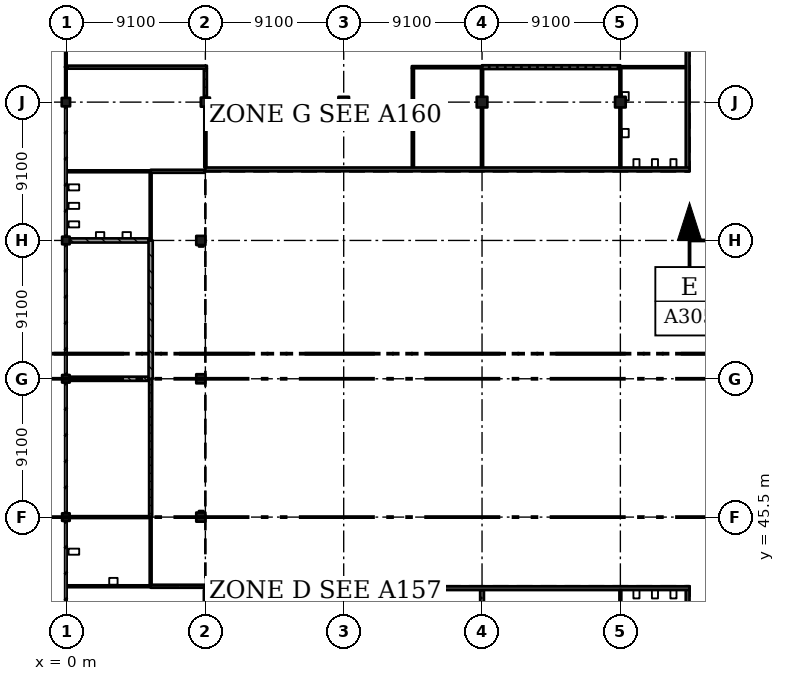
"""IFC4 building model, lengths in metres.
Left out: names, types, materials, properties, quantities, classifications, styles, units other than length and angle.
Written with IfcOpenShell. Run it as: python <this file> out.ifc"""

import sys

from ifc_helpers import new_model, si_unit, direction, frame, frame_2d, origin, origin_2d, place, context, subcontext, project, spatial, rectangle, extrude, element, fill, save


model = new_model("IFC4")
c1 = context("Model", 3, precision=1e-05, world=origin(), true_north=direction((0.0, 1.0)))
c2 = subcontext(c1, "Body", "Model", "MODEL_VIEW")
j1 = project(units=[si_unit("LENGTHUNIT", "METRE"), si_unit("PLANEANGLEUNIT", "RADIAN")], contexts=[c1])
p1 = place(None, origin())
s1 = spatial("IfcSite", under=j1, at=p1, CompositionType="ELEMENT")
p2 = place(p1, origin())
s2 = spatial("IfcBuilding", under=s1, at=p2, CompositionType="ELEMENT")
p3 = place(p2, frame((0.0, 0.0, 20.02)))
s3 = spatial("IfcBuildingStorey", under=s2, at=p3, CompositionType="ELEMENT", Elevation=20.02)
for number, where, z_axis, x_axis in (
    (1, (-0.075, 45.5, 0.0), (0.0, 0.0, 1.0), (1.0, 0.0, 0.0)),
    (2, (-0.075, 54.6, 0.0), (0.0, 0.0, 1.0), (1.0, 0.0, 0.0)),
    (3, (-0.075, 63.7, 0.0), (0.0, 0.0, 1.0), (1.0, 0.0, 0.0)),
):
    element("IfcColumn", number, at=place(p3, frame(where, z_axis=z_axis, x_axis=x_axis)), inside=s3, PredefinedType="COLUMN", context=c2, shape_type="SweptSolid", body=[
        extrude(rectangle(XDim=0.5, YDim=0.5, at=origin_2d()), origin(), (0.0, 0.0, 1.0), 4.55),
    ])
p4 = place(p3, frame((-0.075, 72.8, 0.0), z_axis=(0.0, 0.0, 1.0), x_axis=(1.0, 0.0, 0.0)))
e4 = element("IfcColumn", 4, at=p4, inside=s3, PredefinedType="COLUMN", context=c2, shape_type="SweptSolid", body=[
    extrude(rectangle(XDim=0.55, YDim=0.55, at=origin_2d()), origin(), (0.0, 0.0, 1.0), 4.55),
])
for number, where, z_axis, x_axis in (
    (5, (8.8, 45.5, 0.0), (0.0, 0.0, 1.0), (1.0, 0.0, 0.0)),
    (6, (8.8, 54.6, 0.0), (0.0, 0.0, 1.0), (1.0, 0.0, 0.0)),
    (7, (8.8, 63.7, 0.0), (0.0, 0.0, 1.0), (1.0, 0.0, 0.0)),
    (8, (9.1, 72.8, 0.0), (0.0, 0.0, 1.0), (1.0, 0.0, 0.0)),
):
    element("IfcColumn", number, at=place(p3, frame(where, z_axis=z_axis, x_axis=x_axis)), inside=s3, PredefinedType="COLUMN", context=c2, shape_type="SweptSolid", body=[
        extrude(rectangle(XDim=0.6, YDim=0.6, at=origin_2d()), origin(), (0.0, 0.0, 1.0), 4.55),
    ])
for number, where, z_axis, x_axis in (
    (9, (18.2, 72.8, 0.0), (0.0, 0.0, 1.0), (1.0, 0.0, 0.0)),
    (10, (27.3, 72.8, 0.0), (0.0, 0.0, 1.0), (1.0, 0.0, 0.0)),
    (11, (36.4, 72.8, 0.0), (0.0, 0.0, 1.0), (1.0, 0.0, 0.0)),
):
    element("IfcColumn", number, at=place(p3, frame(where, z_axis=z_axis, x_axis=x_axis)), inside=s3, PredefinedType="COLUMN", context=c2, shape_type="SweptSolid", body=[
        extrude(rectangle(XDim=0.7, YDim=0.7, at=origin_2d()), origin(), (0.0, 0.0, 1.0), 4.55),
    ])
p5 = place(p3, frame((40.825, 68.25, 0.0), z_axis=(0.0, 0.0, 1.0), x_axis=(0.0, 1.0, 0.0)))
e12 = element("IfcWall", 12, at=p5, inside=s3, PredefinedType="SHEAR", context=c2, shape_type="SweptSolid", body=[
    extrude(rectangle(XDim=31.85, YDim=0.25, at=frame_2d((15.925, 0.0))), origin(), (0.0, 0.0, 1.0), 4.55),
])
for number, where, z_axis, x_axis in (
    (13, (40.825, 40.95, 0.0), (0.0, 0.0, 1.0), (0.0, -1.0, 0.0)),
    (14, (40.95, 40.825, 0.0), (0.0, 0.0, 1.0), (-1.0, 0.0, 0.0)),
    (15, (40.95, 68.375, 0.0), (0.0, 0.0, 1.0), (-1.0, 0.0, 0.0)),
):
    element("IfcWall", number, at=place(p3, frame(where, z_axis=z_axis, x_axis=x_axis)), inside=s3, PredefinedType="SHEAR", context=c2, shape_type="SweptSolid", body=[
        extrude(rectangle(XDim=31.85, YDim=0.25, at=frame_2d((15.925, 0.0))), origin(), (0.0, 0.0, 1.0), 4.55),
    ])
p6 = place(p3, frame((0.03, 40.95, 0.0), z_axis=(0.0, 0.0, 1.0), x_axis=(1.0, 0.0, 0.0)))
e16 = element("IfcWall", 16, at=p6, inside=s3, PredefinedType="PARTITIONING", context=c2, shape_type="SweptSolid", body=[
    extrude(rectangle(XDim=5.47, YDim=0.125, at=frame_2d((2.735, 0.0))), origin(), (0.0, 0.0, 1.0), 4.25),
])
p7 = place(p3, frame((0.175, 45.5, 0.0), z_axis=(0.0, 0.0, 1.0), x_axis=(1.0, 0.0, 0.0)))
e17 = element("IfcWall", 17, at=p7, inside=s3, PredefinedType="PARTITIONING", context=c2, shape_type="SweptSolid", body=[
    extrude(rectangle(XDim=5.225, YDim=0.125, at=frame_2d((2.612, 0.0))), origin(), (0.0, 0.0, 1.0), 3.55),
])
for number, where, z_axis, x_axis in (
    (18, (0.175, 54.6, 0.0), (0.0, 0.0, 1.0), (1.0, 0.0, 0.0)),
    (19, (0.175, 63.7, 0.0), (0.0, 0.0, 1.0), (1.0, 0.0, 0.0)),
):
    element("IfcWall", number, at=place(p3, frame(where, z_axis=z_axis, x_axis=x_axis)), inside=s3, PredefinedType="SOLIDWALL", context=c2, shape_type="SweptSolid", body=[
        extrude(rectangle(XDim=5.188, YDim=0.275, at=frame_2d((2.594, 0.0))), origin(), (0.0, 0.0, 1.0), 3.55),
    ])
p8 = place(p3, frame((5.5, 40.95, 0.0), z_axis=(0.0, 0.0, 1.0), x_axis=(1.0, 0.0, 0.0)))
e20 = element("IfcWall", 20, at=p8, inside=s3, PredefinedType="PARTITIONING", context=c2, shape_type="SweptSolid", body=[
    extrude(rectangle(XDim=3.57, YDim=0.2, at=frame_2d((1.785, 0.0))), origin(), (0.0, 0.0, 1.0), 4.25),
])
p9 = place(p8, frame((0.55, 0.0, 0.0)))
e21 = element("IfcOpeningElement", 21, at=p9, cuts=e20, PredefinedType="OPENING", context=c2, shape_type="SweptSolid", body=[
    extrude(rectangle(XDim=2.4, YDim=2.4, at=frame_2d((1.2, 1.2))), frame((0.0, 0.11, 0.0), z_axis=(0.0, -1.0, 0.0), x_axis=(1.0, 0.0, 0.0)), (0.0, 0.0, 1.0), 0.22),
])
p10 = place(p3, frame((5.5, 41.05, 0.0), z_axis=(0.0, 0.0, 1.0), x_axis=(0.0, 1.0, 0.0)))
e22 = element("IfcWall", 22, at=p10, inside=s3, PredefinedType="PARTITIONING", context=c2, shape_type="SweptSolid", body=[
    extrude(rectangle(XDim=4.45, YDim=0.125, at=frame_2d((2.225, 0.0))), origin(), (0.0, 0.0, 1.0), 4.25),
])
p11 = place(p10, frame((1.75, 0.0, 0.0)))
e23 = element("IfcOpeningElement", 23, at=p11, cuts=e22, PredefinedType="OPENING", context=c2, shape_type="SweptSolid", body=[
    extrude(rectangle(XDim=1.0, YDim=2.1, at=frame_2d((0.5, 1.05))), frame((0.0, 0.073, 0.0), z_axis=(0.0, -1.0, 0.0), x_axis=(1.0, 0.0, 0.0)), (0.0, 0.0, 1.0), 0.145),
])
p12 = place(p3, frame((5.5, 45.5, 0.0), z_axis=(0.0, 0.0, 1.0), x_axis=(0.0, 1.0, 0.0)))
e24 = element("IfcWall", 24, at=p12, inside=s3, PredefinedType="PARTITIONING", context=c2, shape_type="SweptSolid", body=[
    extrude(rectangle(XDim=9.1, YDim=0.2, at=frame_2d((4.55, 0.0))), origin(), (0.0, 0.0, 1.0), 4.25),
])
p13 = place(p12, frame((4.05, 0.0, 0.0)))
e25 = element("IfcOpeningElement", 25, at=p13, cuts=e24, PredefinedType="OPENING", context=c2, shape_type="SweptSolid", body=[
    extrude(rectangle(XDim=1.0, YDim=2.1, at=frame_2d((0.5, 1.05))), frame((0.0, 0.11, 0.0), z_axis=(0.0, -1.0, 0.0), x_axis=(1.0, 0.0, 0.0)), (0.0, 0.0, 1.0), 0.22),
])
p14 = place(p3, frame((5.5, 54.6, 0.0), z_axis=(0.0, 0.0, 1.0), x_axis=(0.0, 1.0, 0.0)))
e26 = element("IfcWall", 26, at=p14, inside=s3, PredefinedType="SOLIDWALL", context=c2, shape_type="SweptSolid", body=[
    extrude(rectangle(XDim=9.1, YDim=0.275, at=frame_2d((4.55, 0.0))), origin(), (0.0, 0.0, 1.0), 4.25),
])
p15 = place(p14, frame((3.95, 0.0, 0.0)))
e27 = element("IfcOpeningElement", 27, at=p15, cuts=e26, PredefinedType="OPENING", context=c2, shape_type="SweptSolid", body=[
    extrude(rectangle(XDim=1.2, YDim=2.4, at=frame_2d((0.6, 1.2))), frame((0.0, 0.147, 0.0), z_axis=(0.0, -1.0, 0.0), x_axis=(1.0, 0.0, 0.0)), (0.0, 0.0, 1.0), 0.295),
])
p16 = place(p3, frame((5.5, 63.7, 0.0), z_axis=(0.0, 0.0, 1.0), x_axis=(0.0, 1.0, 0.0)))
e28 = element("IfcWall", 28, at=p16, inside=s3, PredefinedType="PARTITIONING", context=c2, shape_type="SweptSolid", body=[
    extrude(rectangle(XDim=4.45, YDim=0.125, at=frame_2d((2.225, 0.0))), origin(), (0.0, 0.0, 1.0), 4.25),
])
p17 = place(p16, frame((1.75, 0.0, 0.0)))
e29 = element("IfcOpeningElement", 29, at=p17, cuts=e28, PredefinedType="OPENING", context=c2, shape_type="SweptSolid", body=[
    extrude(rectangle(XDim=0.9, YDim=2.1, at=frame_2d((0.45, 1.05))), frame((0.0, 0.073, 0.0), z_axis=(0.0, -1.0, 0.0), x_axis=(1.0, 0.0, 0.0)), (0.0, 0.0, 1.0), 0.145),
])
p18 = place(p3, frame((5.5, 68.25, 0.0), z_axis=(0.0, 0.0, 1.0), x_axis=(-1.0, 0.0, 0.0)))
e30 = element("IfcWall", 30, at=p18, inside=s3, PredefinedType="PARTITIONING", context=c2, shape_type="SweptSolid", body=[
    extrude(rectangle(XDim=5.47, YDim=0.125, at=frame_2d((2.735, 0.0))), origin(), (0.0, 0.0, 1.0), 4.25),
])
for number, where, z_axis, x_axis in (
    (31, (8.675, 63.4, 0.0), (0.0, 0.0, 1.0), (1.0, 0.0, 0.0)),
    (32, (8.975, 45.8, 0.0), (0.0, 0.0, 1.0), (-1.0, 0.0, 0.0)),
):
    element("IfcWall", number, at=place(p3, frame(where, z_axis=z_axis, x_axis=x_axis)), inside=s3, PredefinedType="PARTITIONING", context=c2, shape_type="SweptSolid", body=[
        extrude(rectangle(XDim=0.3, YDim=0.2, at=frame_2d((0.15, 0.0))), origin(), (0.0, 0.0, 1.0), 4.25),
    ])
p19 = place(p3, frame((9.07, 68.25, 0.0), z_axis=(0.0, 0.0, 1.0), x_axis=(-1.0, 0.0, 0.0)))
e33 = element("IfcWall", 33, at=p19, inside=s3, PredefinedType="PARTITIONING", context=c2, shape_type="SweptSolid", body=[
    extrude(rectangle(XDim=3.57, YDim=0.2, at=frame_2d((1.785, 0.0))), origin(), (0.0, 0.0, 1.0), 4.25),
])
p20 = place(p19, frame((0.55, 0.0, 0.0)))
e34 = element("IfcOpeningElement", 34, at=p20, cuts=e33, PredefinedType="OPENING", context=c2, shape_type="SweptSolid", body=[
    extrude(rectangle(XDim=2.4, YDim=2.4, at=frame_2d((1.2, 1.2))), frame((0.0, 0.11, 0.0), z_axis=(0.0, -1.0, 0.0), x_axis=(1.0, 0.0, 0.0)), (0.0, 0.0, 1.0), 0.22),
])
p21 = place(p3, frame((9.1, 36.7, 0.0), z_axis=(0.0, 0.0, 1.0), x_axis=(0.0, 1.0, 0.0)))
e35 = element("IfcWall", 35, at=p21, inside=s3, PredefinedType="PARTITIONING", context=c2, shape_type="SweptSolid", body=[
    extrude(rectangle(XDim=4.0, YDim=0.2, at=frame_2d((2.0, 0.0))), origin(), (0.0, 0.0, 1.0), 3.25),
])
p22 = place(p3, frame((9.1, 68.5, 0.0), z_axis=(0.0, 0.0, 1.0), x_axis=(0.0, 1.0, 0.0)))
e36 = element("IfcWall", 36, at=p22, inside=s3, PredefinedType="SOLIDWALL", context=c2, shape_type="SweptSolid", body=[
    extrude(rectangle(XDim=4.0, YDim=0.14, at=frame_2d((2.0, 0.0))), origin(), (0.0, 0.0, 1.0), 3.25),
])
p23 = place(p3, frame((9.1, 73.1, 0.0), z_axis=(0.0, 0.0, 1.0), x_axis=(0.0, 1.0, 0.0)))
e37 = element("IfcWall", 37, at=p23, inside=s3, PredefinedType="PARTITIONING", context=c2, shape_type="SweptSolid", body=[
    extrude(rectangle(XDim=1.9, YDim=0.2, at=frame_2d((0.95, 0.0))), origin(), (0.0, 0.0, 1.0), 3.5),
])
p24 = place(p3, frame((9.2, 75.1, 0.0), z_axis=(0.0, 0.0, 1.0), x_axis=(-1.0, 0.0, 0.0)))
e38 = element("IfcWall", 38, at=p24, inside=s3, PredefinedType="PARTITIONING", context=c2, shape_type="SweptSolid", body=[
    extrude(rectangle(XDim=9.17, YDim=0.2, at=frame_2d((4.585, 0.0))), origin(), (0.0, 0.0, 1.0), 4.25),
])
p25 = place(p24, frame((1.05, 0.0, 0.0)))
e39 = element("IfcOpeningElement", 39, at=p25, cuts=e38, PredefinedType="OPENING", context=c2, shape_type="SweptSolid", body=[
    extrude(rectangle(XDim=2.4, YDim=2.4, at=frame_2d((1.2, 1.2))), frame((0.0, 0.11, 0.0), z_axis=(0.0, -1.0, 0.0), x_axis=(1.0, 0.0, 0.0)), (0.0, 0.0, 1.0), 0.22),
])
p26 = place(p24, frame((5.65, 0.0, 0.0)))
e40 = element("IfcOpeningElement", 40, at=p26, cuts=e38, PredefinedType="OPENING", context=c2, shape_type="SweptSolid", body=[
    extrude(rectangle(XDim=2.4, YDim=2.4, at=frame_2d((1.2, 1.2))), frame((0.0, 0.11, 0.0), z_axis=(0.0, -1.0, 0.0), x_axis=(1.0, 0.0, 0.0)), (0.0, 0.0, 1.0), 0.22),
])
p27 = place(p3, frame((9.4, 72.8, 0.0), z_axis=(0.0, 0.0, 1.0), x_axis=(1.0, 0.0, 0.0)))
e41 = element("IfcWall", 41, at=p27, inside=s3, PredefinedType="SOLIDWALL", context=c2, shape_type="SweptSolid", body=[
    extrude(rectangle(XDim=8.45, YDim=0.14, at=frame_2d((4.225, 0.0))), origin(), (0.0, 0.0, 1.0), 3.5),
])
p28 = place(p27, frame((3.45, 0.0, 0.0)))
e42 = element("IfcOpeningElement", 42, at=p28, cuts=e41, PredefinedType="OPENING", context=c2, shape_type="SweptSolid", body=[
    extrude(rectangle(XDim=1.5, YDim=2.1, at=frame_2d((0.75, 1.05))), frame((0.0, 0.08, 0.0), z_axis=(0.0, -1.0, 0.0), x_axis=(1.0, 0.0, 0.0)), (0.0, 0.0, 1.0), 0.16),
])
p29 = place(p3, frame((18.55, 72.8, 0.0), z_axis=(0.0, 0.0, 1.0), x_axis=(1.0, 0.0, 0.0)))
e43 = element("IfcWall", 43, at=p29, inside=s3, PredefinedType="SOLIDWALL", context=c2, shape_type="SweptSolid", body=[
    extrude(rectangle(XDim=4.13, YDim=0.14, at=frame_2d((2.065, 0.0))), origin(), (0.0, 0.0, 1.0), 3.55),
])
p30 = place(p3, frame((22.68, 75.1, 0.0), z_axis=(0.0, 0.0, 1.0), x_axis=(1.0, 0.0, 0.0)))
e44 = element("IfcWall", 44, at=p30, inside=s3, PredefinedType="SOLIDWALL", context=c2, shape_type="SweptSolid", body=[
    extrude(rectangle(XDim=4.62, YDim=0.14, at=frame_2d((2.31, 0.0))), origin(), (0.0, 0.0, 1.0), 4.25),
])
p31 = place(p30, frame((1.55, 0.0, 0.0)))
e45 = element("IfcOpeningElement", 45, at=p31, cuts=e44, PredefinedType="OPENING", context=c2, shape_type="SweptSolid", body=[
    extrude(rectangle(XDim=1.5, YDim=2.1, at=frame_2d((0.75, 1.05))), frame((0.0, 0.08, 0.0), z_axis=(0.0, -1.0, 0.0), x_axis=(1.0, 0.0, 0.0)), (0.0, 0.0, 1.0), 0.16),
])
p32 = place(p3, frame((22.75, 68.5, 0.0), z_axis=(0.0, 0.0, 1.0), x_axis=(0.0, 1.0, 0.0)))
e46 = element("IfcWall", 46, at=p32, inside=s3, PredefinedType="SOLIDWALL", context=c2, shape_type="SweptSolid", body=[
    extrude(rectangle(XDim=6.53, YDim=0.14, at=frame_2d((3.265, 0.0))), origin(), (0.0, 0.0, 1.0), 4.25),
])
p33 = place(p3, frame((27.3, 40.7, 0.0), z_axis=(0.0, 0.0, 1.0), x_axis=(0.0, -1.0, 0.0)))
e47 = element("IfcWall", 47, at=p33, inside=s3, PredefinedType="SOLIDWALL", context=c2, shape_type="SweptSolid", body=[
    extrude(rectangle(XDim=3.95, YDim=0.25, at=frame_2d((1.975, 0.0))), origin(), (0.0, 0.0, 1.0), 4.25),
])
p34 = place(p3, frame((27.3, 72.45, 0.0), z_axis=(0.0, 0.0, 1.0), x_axis=(0.0, -1.0, 0.0)))
e48 = element("IfcWall", 48, at=p34, inside=s3, PredefinedType="SOLIDWALL", context=c2, shape_type="SweptSolid", body=[
    extrude(rectangle(XDim=3.95, YDim=0.14, at=frame_2d((1.975, 0.0))), origin(), (0.0, 0.0, 1.0), 4.25),
])
p35 = place(p3, frame((27.3, 74.975, 0.0), z_axis=(0.0, 0.0, 1.0), x_axis=(0.0, -1.0, 0.0)))
e49 = element("IfcWall", 49, at=p35, inside=s3, PredefinedType="SOLIDWALL", context=c2, shape_type="SweptSolid", body=[
    extrude(rectangle(XDim=1.825, YDim=0.14, at=frame_2d((0.913, 0.0))), origin(), (0.0, 0.0, 1.0), 3.5),
])
p36 = place(p3, frame((27.3, 75.1, 0.0), z_axis=(0.0, 0.0, 1.0), x_axis=(1.0, 0.0, 0.0)))
e50 = element("IfcWall", 50, at=p36, inside=s3, PredefinedType="SOLIDWALL", context=c2, shape_type="SweptSolid", body=[
    extrude(rectangle(XDim=9.1, YDim=0.25, at=frame_2d((4.55, 0.0))), origin(), (0.0, 0.0, 1.0), 4.25),
])
p37 = place(p36, frame((4.05, 0.0, 0.0)))
e51 = element("IfcOpeningElement", 51, at=p37, cuts=e50, PredefinedType="OPENING", context=c2, shape_type="SweptSolid", body=[
    extrude(rectangle(XDim=1.0, YDim=2.1, at=frame_2d((0.5, 1.05))), frame((0.0, 0.135, 0.0), z_axis=(0.0, -1.0, 0.0), x_axis=(1.0, 0.0, 0.0)), (0.0, 0.0, 1.0), 0.27),
])
for number, where, z_axis, x_axis in (
    (52, (36.4, 40.7, 0.0), (0.0, 0.0, 1.0), (0.0, -1.0, 0.0)),
    (53, (36.4, 72.45, 0.0), (0.0, 0.0, 1.0), (0.0, -1.0, 0.0)),
):
    element("IfcWall", number, at=place(p3, frame(where, z_axis=z_axis, x_axis=x_axis)), inside=s3, PredefinedType="PARTITIONING", context=c2, shape_type="SweptSolid", body=[
        extrude(rectangle(XDim=3.95, YDim=0.125, at=frame_2d((1.975, 0.0))), origin(), (0.0, 0.0, 1.0), 4.25),
    ])
p38 = place(p3, frame((36.4, 74.975, 0.0), z_axis=(0.0, 0.0, 1.0), x_axis=(0.0, -1.0, 0.0)))
e54 = element("IfcWall", 54, at=p38, inside=s3, PredefinedType="PARTITIONING", context=c2, shape_type="SweptSolid", body=[
    extrude(rectangle(XDim=1.825, YDim=0.125, at=frame_2d((0.913, 0.0))), origin(), (0.0, 0.0, 1.0), 3.5),
])
p39 = place(p3, frame((36.4, 75.1, 0.0), z_axis=(0.0, 0.0, 1.0), x_axis=(1.0, 0.0, 0.0)))
e55 = element("IfcWall", 55, at=p39, inside=s3, PredefinedType="PARTITIONING", context=c2, shape_type="SweptSolid", body=[
    extrude(rectangle(XDim=4.3, YDim=0.125, at=frame_2d((2.15, 0.0))), origin(), (0.0, 0.0, 1.0), 4.25),
])
p40 = place(p39, frame((1.75, 0.0, 0.0)))
e56 = element("IfcOpeningElement", 56, at=p40, cuts=e55, PredefinedType="OPENING", context=c2, shape_type="SweptSolid", body=[
    extrude(rectangle(XDim=0.9, YDim=2.1, at=frame_2d((0.45, 1.05))), frame((0.0, 0.073, 0.0), z_axis=(0.0, -1.0, 0.0), x_axis=(1.0, 0.0, 0.0)), (0.0, 0.0, 1.0), 0.145),
])
p41 = place(p28, origin())
e57 = element("IfcDoor", 57, at=p41, inside=s3, OperationType="DOUBLE_DOOR_SINGLE_SWING", PredefinedType="DOOR", context=c2, shape_type="SweptSolid", body=[
    extrude(rectangle(XDim=1.5, YDim=2.1, at=frame_2d((0.75, 1.05))), frame((0.0, 0.025, 0.0), z_axis=(0.0, -1.0, 0.0), x_axis=(1.0, 0.0, 0.0)), (0.0, 0.0, 1.0), 0.05),
])
fill(e42, e57)
p42 = place(p31, origin())
e58 = element("IfcDoor", 58, at=p42, inside=s3, OperationType="DOUBLE_DOOR_SINGLE_SWING", PredefinedType="DOOR", context=c2, shape_type="SweptSolid", body=[
    extrude(rectangle(XDim=1.5, YDim=2.1, at=frame_2d((0.75, 1.05))), frame((0.0, 0.025, 0.0), z_axis=(0.0, -1.0, 0.0), x_axis=(1.0, 0.0, 0.0)), (0.0, 0.0, 1.0), 0.05),
])
fill(e45, e58)
p43 = place(p37, origin())
e59 = element("IfcDoor", 59, at=p43, inside=s3, OperationType="SINGLE_SWING_RIGHT", PredefinedType="DOOR", context=c2, shape_type="SweptSolid", body=[
    extrude(rectangle(XDim=1.0, YDim=2.1, at=frame_2d((0.5, 1.05))), frame((0.0, 0.025, 0.0), z_axis=(0.0, -1.0, 0.0), x_axis=(1.0, 0.0, 0.0)), (0.0, 0.0, 1.0), 0.05),
])
fill(e51, e59)
p44 = place(p40, origin())
e60 = element("IfcDoor", 60, at=p44, inside=s3, OperationType="SINGLE_SWING_RIGHT", PredefinedType="DOOR", context=c2, shape_type="SweptSolid", body=[
    extrude(rectangle(XDim=0.9, YDim=2.1, at=frame_2d((0.45, 1.05))), frame((0.0, 0.025, 0.0), z_axis=(0.0, -1.0, 0.0), x_axis=(1.0, 0.0, 0.0)), (0.0, 0.0, 1.0), 0.05),
])
fill(e56, e60)
p45 = place(p11, origin())
e61 = element("IfcDoor", 61, at=p45, inside=s3, OperationType="SINGLE_SWING_LEFT", PredefinedType="DOOR", context=c2, shape_type="SweptSolid", body=[
    extrude(rectangle(XDim=1.0, YDim=2.1, at=frame_2d((0.5, 1.05))), frame((0.0, 0.025, 0.0), z_axis=(0.0, -1.0, 0.0), x_axis=(1.0, 0.0, 0.0)), (0.0, 0.0, 1.0), 0.05),
])
fill(e23, e61)
p46 = place(p13, origin())
e62 = element("IfcDoor", 62, at=p46, inside=s3, OperationType="SINGLE_SWING_RIGHT", PredefinedType="DOOR", context=c2, shape_type="SweptSolid", body=[
    extrude(rectangle(XDim=1.0, YDim=2.1, at=frame_2d((0.5, 1.05))), frame((0.0, 0.025, 0.0), z_axis=(0.0, -1.0, 0.0), x_axis=(1.0, 0.0, 0.0)), (0.0, 0.0, 1.0), 0.05),
])
fill(e25, e62)
p47 = place(p15, origin())
e63 = element("IfcDoor", 63, at=p47, inside=s3, OperationType="SINGLE_SWING_RIGHT", PredefinedType="DOOR", context=c2, shape_type="SweptSolid", body=[
    extrude(rectangle(XDim=1.2, YDim=2.4, at=frame_2d((0.6, 1.2))), frame((0.0, 0.025, 0.0), z_axis=(0.0, -1.0, 0.0), x_axis=(1.0, 0.0, 0.0)), (0.0, 0.0, 1.0), 0.05),
])
fill(e27, e63)
p48 = place(p17, origin())
e64 = element("IfcDoor", 64, at=p48, inside=s3, OperationType="SINGLE_SWING_RIGHT", PredefinedType="DOOR", context=c2, shape_type="SweptSolid", body=[
    extrude(rectangle(XDim=0.9, YDim=2.1, at=frame_2d((0.45, 1.05))), frame((0.0, 0.025, 0.0), z_axis=(0.0, -1.0, 0.0), x_axis=(1.0, 0.0, 0.0)), (0.0, 0.0, 1.0), 0.05),
])
fill(e29, e64)
p49 = place(p9, origin())
e65 = element("IfcDoor", 65, at=p49, inside=s3, OperationType="DOUBLE_DOOR_SINGLE_SWING", PredefinedType="DOOR", context=c2, shape_type="SweptSolid", body=[
    extrude(rectangle(XDim=2.4, YDim=2.4, at=frame_2d((1.2, 1.2))), frame((0.0, 0.025, 0.0), z_axis=(0.0, -1.0, 0.0), x_axis=(1.0, 0.0, 0.0)), (0.0, 0.0, 1.0), 0.05),
])
fill(e21, e65)
p50 = place(p25, origin())
e66 = element("IfcDoor", 66, at=p50, inside=s3, OperationType="DOUBLE_DOOR_SINGLE_SWING", PredefinedType="DOOR", context=c2, shape_type="SweptSolid", body=[
    extrude(rectangle(XDim=2.4, YDim=2.4, at=frame_2d((1.2, 1.2))), frame((0.0, 0.025, 0.0), z_axis=(0.0, -1.0, 0.0), x_axis=(1.0, 0.0, 0.0)), (0.0, 0.0, 1.0), 0.05),
])
fill(e39, e66)
p51 = place(p26, origin())
e67 = element("IfcDoor", 67, at=p51, inside=s3, OperationType="DOUBLE_DOOR_SINGLE_SWING", PredefinedType="DOOR", context=c2, shape_type="SweptSolid", body=[
    extrude(rectangle(XDim=2.4, YDim=2.4, at=frame_2d((1.2, 1.2))), frame((0.0, 0.025, 0.0), z_axis=(0.0, -1.0, 0.0), x_axis=(1.0, 0.0, 0.0)), (0.0, 0.0, 1.0), 0.05),
])
fill(e40, e67)
p52 = place(p20, origin())
e68 = element("IfcDoor", 68, at=p52, inside=s3, OperationType="DOUBLE_DOOR_SINGLE_SWING", PredefinedType="DOOR", context=c2, shape_type="SweptSolid", body=[
    extrude(rectangle(XDim=2.4, YDim=2.4, at=frame_2d((1.2, 1.2))), frame((0.0, 0.025, 0.0), z_axis=(0.0, -1.0, 0.0), x_axis=(1.0, 0.0, 0.0)), (0.0, 0.0, 1.0), 0.05),
])
fill(e34, e68)
save(model, sys.argv[1])
